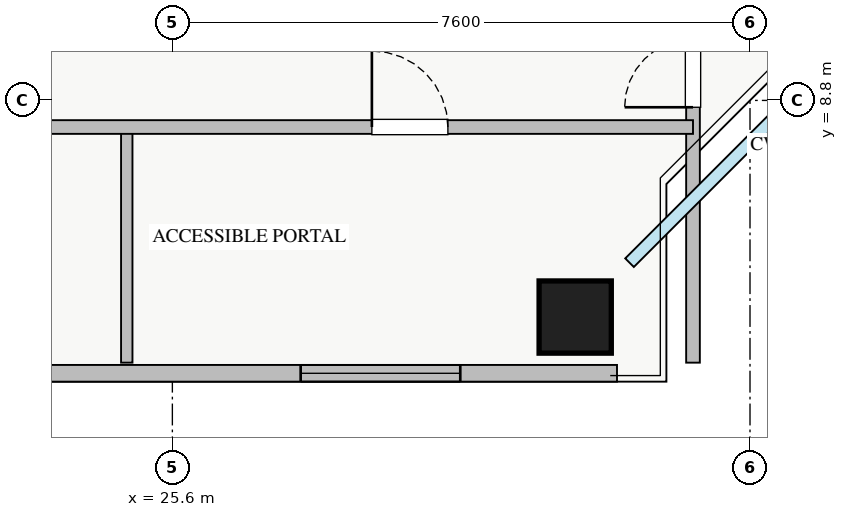
"""IFC4 building model, lengths in metres.
Left out: names, types, materials, properties, quantities, classifications, styles, units other than length and angle.
Written with IfcOpenShell. Run it as: python <this file> out.ifc"""

import sys

from ifc_helpers import new_model, si_unit, direction, frame, frame_2d, origin, origin_2d, place, context, subcontext, project, spatial, rectangle, extrude, source, transform, mapped, element, fill, save


model = new_model("IFC4")
c1 = context("Model", 3, precision=1e-05, world=origin(), true_north=direction((0.0, 1.0)))
c2 = subcontext(c1, "Body", "Model", "MODEL_VIEW")
j1 = project(units=[si_unit("LENGTHUNIT", "METRE"), si_unit("PLANEANGLEUNIT", "RADIAN")], contexts=[c1])
p1 = place(None, origin())
s1 = spatial("IfcSite", under=j1, at=p1, CompositionType="ELEMENT")
p2 = place(p1, origin())
s2 = spatial("IfcBuilding", under=s1, at=p2, CompositionType="ELEMENT")
p3 = place(p2, frame((0.0, 0.0, 156.75)))
s3 = spatial("IfcBuildingStorey", under=s2, at=p3, CompositionType="ELEMENT", Elevation=156.75)
m1 = source(origin(), c2, "Body", "SweptSolid", [
    extrude(rectangle(XDim=0.95, YDim=0.95, at=origin_2d()), origin(), (0.0, 0.0, 1.0), 3.25),
])
p4 = place(p3, frame((30.9, 5.95, 0.0), z_axis=(0.0, 0.0, 1.0), x_axis=(1.0, 0.0, 0.0)))
e1 = element("IfcColumn", 1, at=p4, inside=s3, PredefinedType="COLUMN", context=c2, shape_type="MappedRepresentation", body=[
    mapped(m1, transform((0.0, 0.0, 0.0), x_axis=(1.0, 0.0, 0.0), y_axis=(0.0, 1.0, 0.0), z_axis=(0.0, 0.0, 1.0), scale=1.0)),
])
p5 = place(p3, frame((6.55, 5.21, 0.0), z_axis=(0.0, 0.0, 1.0), x_axis=(1.0, 0.0, 0.0)))
e2 = element("IfcWall", 2, at=p5, inside=s3, PredefinedType="STANDARD", context=c2, shape_type="SweptSolid", body=[
    extrude(rectangle(XDim=24.9, YDim=0.22, at=frame_2d((12.45, 0.0))), origin(), (0.0, 0.0, 1.0), 2.61),
])
p6 = place(p5, frame((0.3, 0.0, 0.9)))
e3 = element("IfcOpeningElement", 3, at=p6, cuts=e2, PredefinedType="OPENING", context=c2, shape_type="SweptSolid", body=[
    extrude(rectangle(XDim=1.5, YDim=1.5, at=frame_2d((0.75, 0.75))), frame((0.0, 0.12, 0.0), z_axis=(0.0, -1.0, 0.0), x_axis=(1.0, 0.0, 0.0)), (0.0, 0.0, 1.0), 0.24),
])
p7 = place(p5, frame((7.304, 0.0, 0.9)))
e4 = element("IfcOpeningElement", 4, at=p7, cuts=e2, PredefinedType="OPENING", context=c2, shape_type="SweptSolid", body=[
    extrude(rectangle(XDim=1.8, YDim=1.5, at=frame_2d((0.9, 0.75))), frame((0.0, 0.12, 0.0), z_axis=(0.0, -1.0, 0.0), x_axis=(1.0, 0.0, 0.0)), (0.0, 0.0, 1.0), 0.24),
])
p8 = place(p5, frame((14.813, 0.0, 0.9)))
e5 = element("IfcOpeningElement", 5, at=p8, cuts=e2, PredefinedType="OPENING", context=c2, shape_type="SweptSolid", body=[
    extrude(rectangle(XDim=1.5, YDim=1.45, at=frame_2d((0.75, 0.725))), frame((0.0, 0.12, 0.0), z_axis=(0.0, -1.0, 0.0), x_axis=(1.0, 0.0, 0.0)), (0.0, 0.0, 1.0), 0.24),
])
p9 = place(p5, frame((20.738, 0.0, 0.9)))
e6 = element("IfcOpeningElement", 6, at=p9, cuts=e2, PredefinedType="OPENING", context=c2, shape_type="SweptSolid", body=[
    extrude(rectangle(XDim=2.1, YDim=1.48, at=frame_2d((1.05, 0.74))), frame((0.0, 0.12, 0.0), z_axis=(0.0, -1.0, 0.0), x_axis=(1.0, 0.0, 0.0)), (0.0, 0.0, 1.0), 0.24),
])
p10 = place(p5, frame((4.094, 0.0, 0.9)))
e7 = element("IfcOpeningElement", 7, at=p10, cuts=e2, PredefinedType="OPENING", context=c2, shape_type="SweptSolid", body=[
    extrude(rectangle(XDim=2.4, YDim=1.5, at=frame_2d((1.2, 0.75))), frame((0.0, 0.12, 0.0), z_axis=(0.0, -1.0, 0.0), x_axis=(1.0, 0.0, 0.0)), (0.0, 0.0, 1.0), 0.24),
])
p11 = place(p3, frame((32.45, 5.35, 0.0), z_axis=(0.0, 0.0, 1.0), x_axis=(0.0, 1.0, 0.0)))
e8 = element("IfcWall", 8, at=p11, inside=s3, PredefinedType="PARTITIONING", context=c2, shape_type="SweptSolid", body=[
    extrude(rectangle(XDim=11.35, YDim=0.18, at=frame_2d((5.675, 0.0))), origin(), (0.0, 0.0, 1.0), 3.07),
])
p12 = place(p11, frame((3.36, 0.0, 0.0)))
e9 = element("IfcOpeningElement", 9, at=p12, cuts=e8, PredefinedType="OPENING", context=c2, shape_type="SweptSolid", body=[
    extrude(rectangle(XDim=0.9, YDim=2.05, at=frame_2d((0.45, 1.025))), frame((0.0, 0.1, 0.0), z_axis=(0.0, -1.0, 0.0), x_axis=(1.0, 0.0, 0.0)), (0.0, 0.0, 1.0), 0.2),
])
p13 = place(p11, frame((5.785, 0.0, 0.0)))
e10 = element("IfcOpeningElement", 10, at=p13, cuts=e8, PredefinedType="OPENING", context=c2, shape_type="SweptSolid", body=[
    extrude(rectangle(XDim=1.0, YDim=2.05, at=frame_2d((0.5, 1.025))), frame((0.0, 0.1, 0.0), z_axis=(0.0, -1.0, 0.0), x_axis=(1.0, 0.0, 0.0)), (0.0, 0.0, 1.0), 0.2),
])
p14 = place(p3, frame((25.0, 5.35, 0.0), z_axis=(0.0, 0.0, 1.0), x_axis=(0.0, 1.0, 0.0)))
e11 = element("IfcWall", 11, at=p14, inside=s3, PredefinedType="PARTITIONING", context=c2, shape_type="SweptSolid", body=[
    extrude(rectangle(XDim=3.1, YDim=0.15, at=frame_2d((1.55, 0.0))), origin(), (0.0, 0.0, 1.0), 3.07),
])
p15 = place(p3, frame((8.65, 8.45, 0.0), z_axis=(0.0, 0.0, 1.0), x_axis=(1.0, 0.0, 0.0)))
e12 = element("IfcWall", 12, at=p15, inside=s3, PredefinedType="PARTITIONING", context=c2, shape_type="SweptSolid", body=[
    extrude(rectangle(XDim=23.8, YDim=0.18, at=frame_2d((11.9, 0.0))), origin(), (0.0, 0.0, 1.0), 3.07),
])
p16 = place(p15, frame((3.425, 0.0, 0.0)))
e13 = element("IfcOpeningElement", 13, at=p16, cuts=e12, PredefinedType="OPENING", context=c2, shape_type="SweptSolid", body=[
    extrude(rectangle(XDim=1.0, YDim=2.05, at=frame_2d((0.5, 1.025))), frame((0.0, 0.1, 0.0), z_axis=(0.0, -1.0, 0.0), x_axis=(1.0, 0.0, 0.0)), (0.0, 0.0, 1.0), 0.2),
])
p17 = place(p15, frame((11.6, 0.0, 0.0)))
e14 = element("IfcOpeningElement", 14, at=p17, cuts=e12, PredefinedType="OPENING", context=c2, shape_type="SweptSolid", body=[
    extrude(rectangle(XDim=1.0, YDim=2.05, at=frame_2d((0.5, 1.025))), frame((0.0, 0.1, 0.0), z_axis=(0.0, -1.0, 0.0), x_axis=(1.0, 0.0, 0.0)), (0.0, 0.0, 1.0), 0.2),
])
p18 = place(p15, frame((19.575, 0.0, 0.0)))
e15 = element("IfcOpeningElement", 15, at=p18, cuts=e12, PredefinedType="OPENING", context=c2, shape_type="SweptSolid", body=[
    extrude(rectangle(XDim=1.0, YDim=2.05, at=frame_2d((0.5, 1.025))), frame((0.0, 0.1, 0.0), z_axis=(0.0, -1.0, 0.0), x_axis=(1.0, 0.0, 0.0)), (0.0, 0.0, 1.0), 0.2),
])
m2 = source(origin(), c2, "Body", "SweptSolid", [
    extrude(rectangle(XDim=2.1, YDim=1.48, at=frame_2d((1.05, 0.74))), frame((0.0, 0.03, 0.0), z_axis=(0.0, -1.0, 0.0), x_axis=(1.0, 0.0, 0.0)), (0.0, 0.0, 1.0), 0.06),
])
p19 = place(p9, origin())
e16 = element("IfcWindow", 16, at=p19, inside=s3, PartitioningType="TRIPLE_PANEL_VERTICAL", PredefinedType="WINDOW", context=c2, shape_type="MappedRepresentation", body=[
    mapped(m2, transform((0.0, 0.0, 0.0), x_axis=(1.0, 0.0, 0.0), y_axis=(0.0, 1.0, 0.0), z_axis=(0.0, 0.0, 1.0), scale=1.0)),
])
fill(e6, e16)
m3 = source(origin(), c2, "Body", "SweptSolid", [
    extrude(rectangle(XDim=0.9, YDim=2.05, at=frame_2d((0.45, 1.025))), frame((0.0, 0.025, 0.0), z_axis=(0.0, -1.0, 0.0), x_axis=(1.0, 0.0, 0.0)), (0.0, 0.0, 1.0), 0.05),
])
p20 = place(p12, origin())
e17 = element("IfcDoor", 17, at=p20, inside=s3, OperationType="SINGLE_SWING_LEFT", PredefinedType="DOOR", context=c2, shape_type="MappedRepresentation", body=[
    mapped(m3, transform((0.0, 0.0, 0.0), x_axis=(1.0, 0.0, 0.0), y_axis=(0.0, 1.0, 0.0), z_axis=(0.0, 0.0, 1.0), scale=1.0)),
])
fill(e9, e17)
m4 = source(origin(), c2, "Body", "SweptSolid", [
    extrude(rectangle(XDim=1.0, YDim=2.05, at=frame_2d((0.5, 1.025))), frame((0.0, 0.025, 0.0), z_axis=(0.0, -1.0, 0.0), x_axis=(1.0, 0.0, 0.0)), (0.0, 0.0, 1.0), 0.05),
])
p21 = place(p18, origin())
e18 = element("IfcDoor", 18, at=p21, inside=s3, OperationType="SINGLE_SWING_LEFT", PredefinedType="DOOR", context=c2, shape_type="MappedRepresentation", body=[
    mapped(m4, transform((0.0, 0.0, 0.0), x_axis=(1.0, 0.0, 0.0), y_axis=(0.0, 1.0, 0.0), z_axis=(0.0, 0.0, 1.0), scale=1.0)),
])
fill(e15, e18)
save(model, sys.argv[1])
